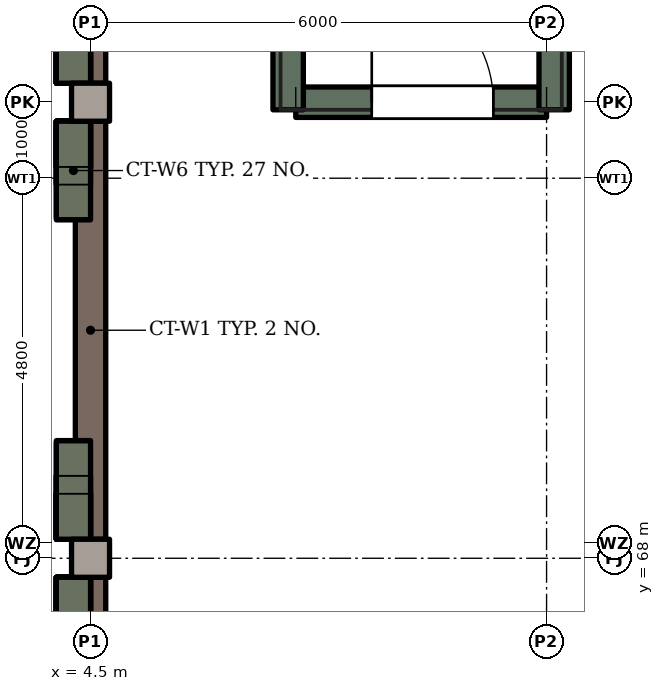
"""IFC4 building model, lengths in metres.
Left out: names, types, materials, properties, quantities, classifications, styles, units other than length and angle.
Written with IfcOpenShell. Run it as: python <this file> out.ifc"""

import sys

from ifc_helpers import new_model, si_unit, direction, frame, frame_2d, origin, origin_2d, place, context, subcontext, project, spatial, rectangle, extrude, element, fill, save


model = new_model("IFC4")
c1 = context("Model", 3, precision=1e-05, world=origin(), true_north=direction((0.0, 1.0)))
c2 = subcontext(c1, "Body", "Model", "MODEL_VIEW")
j1 = project(units=[si_unit("LENGTHUNIT", "METRE"), si_unit("PLANEANGLEUNIT", "RADIAN")], contexts=[c1])
p1 = place(None, origin())
s1 = spatial("IfcSite", under=j1, at=p1, CompositionType="ELEMENT")
p2 = place(p1, origin())
s2 = spatial("IfcBuilding", under=s1, at=p2, CompositionType="ELEMENT")
p3 = place(p2, frame((0.0, 0.0, 4.2)))
s3 = spatial("IfcBuildingStorey", under=s2, at=p3, CompositionType="ELEMENT", Elevation=4.2)
p4 = place(p3, frame((4.275, 67.75, -2.3), z_axis=(0.0, 0.0, 1.0), x_axis=(0.0, -1.0, 0.0)))
e1 = element("IfcWall", 1, at=p4, inside=s3, PredefinedType="STANDARD", context=c2, shape_type="SweptSolid", body=[
    extrude(rectangle(XDim=0.6, YDim=0.45, at=frame_2d((0.3, 0.0))), origin(), (0.0, 0.0, 1.0), 0.8),
])
p5 = place(p3, frame((4.275, 67.75, -1.5), z_axis=(0.0, 0.0, 1.0), x_axis=(0.0, -1.0, 0.0)))
e2 = element("IfcWall", 2, at=p5, inside=s3, PredefinedType="STANDARD", context=c2, shape_type="SweptSolid", body=[
    extrude(rectangle(XDim=0.831, YDim=0.45, at=frame_2d((0.416, 0.0))), origin(), (0.0, 0.0, 1.0), 0.45),
])
p6 = place(p3, frame((4.275, 67.75, -1.05), z_axis=(0.0, 0.0, 1.0), x_axis=(0.0, -1.0, 0.0)))
e3 = element("IfcWall", 3, at=p6, inside=s3, PredefinedType="STANDARD", context=c2, shape_type="SweptSolid", body=[
    extrude(rectangle(XDim=1.272, YDim=0.45, at=frame_2d((0.636, 0.0))), origin(), (0.0, 0.0, 1.0), 0.1),
])
for number, where, z_axis, x_axis in (
    (4, (4.275, 68.25, -2.3), (0.0, 0.0, 1.0), (0.0, 1.0, 0.0)),
    (5, (4.275, 73.75, -2.3), (0.0, 0.0, 1.0), (0.0, -1.0, 0.0)),
):
    element("IfcWall", number, at=place(p3, frame(where, z_axis=z_axis, x_axis=x_axis)), inside=s3, PredefinedType="STANDARD", context=c2, shape_type="SweptSolid", body=[
        extrude(rectangle(XDim=0.6, YDim=0.45, at=frame_2d((0.3, 0.0))), origin(), (0.0, 0.0, 1.0), 0.8),
    ])
for number, where, z_axis, x_axis in (
    (6, (4.275, 68.25, -1.5), (0.0, 0.0, 1.0), (0.0, 1.0, 0.0)),
    (7, (4.275, 73.75, -1.5), (0.0, 0.0, 1.0), (0.0, -1.0, 0.0)),
):
    element("IfcWall", number, at=place(p3, frame(where, z_axis=z_axis, x_axis=x_axis)), inside=s3, PredefinedType="STANDARD", context=c2, shape_type="SweptSolid", body=[
        extrude(rectangle(XDim=0.831, YDim=0.45, at=frame_2d((0.416, 0.0))), origin(), (0.0, 0.0, 1.0), 0.45),
    ])
for number, where, z_axis, x_axis in (
    (8, (4.275, 68.25, -1.05), (0.0, 0.0, 1.0), (0.0, 1.0, 0.0)),
    (9, (4.275, 73.75, -1.05), (0.0, 0.0, 1.0), (0.0, -1.0, 0.0)),
):
    element("IfcWall", number, at=place(p3, frame(where, z_axis=z_axis, x_axis=x_axis)), inside=s3, PredefinedType="STANDARD", context=c2, shape_type="SweptSolid", body=[
        extrude(rectangle(XDim=1.272, YDim=0.45, at=frame_2d((0.636, 0.0))), origin(), (0.0, 0.0, 1.0), 0.1),
    ])
p7 = place(p3, frame((4.275, 74.25, -2.3), z_axis=(0.0, 0.0, 1.0), x_axis=(0.0, 1.0, 0.0)))
e10 = element("IfcWall", 10, at=p7, inside=s3, PredefinedType="STANDARD", context=c2, shape_type="SweptSolid", body=[
    extrude(rectangle(XDim=0.6, YDim=0.45, at=frame_2d((0.3, 0.0))), origin(), (0.0, 0.0, 1.0), 0.8),
])
p8 = place(p3, frame((4.275, 74.25, -1.5), z_axis=(0.0, 0.0, 1.0), x_axis=(0.0, 1.0, 0.0)))
e11 = element("IfcWall", 11, at=p8, inside=s3, PredefinedType="STANDARD", context=c2, shape_type="SweptSolid", body=[
    extrude(rectangle(XDim=0.831, YDim=0.45, at=frame_2d((0.416, 0.0))), origin(), (0.0, 0.0, 1.0), 0.45),
])
p9 = place(p3, frame((4.275, 74.25, -1.05), z_axis=(0.0, 0.0, 1.0), x_axis=(0.0, 1.0, 0.0)))
e12 = element("IfcWall", 12, at=p9, inside=s3, PredefinedType="STANDARD", context=c2, shape_type="SweptSolid", body=[
    extrude(rectangle(XDim=1.272, YDim=0.45, at=frame_2d((0.636, 0.0))), origin(), (0.0, 0.0, 1.0), 0.1),
])
for number, where, z_axis, x_axis in (
    (13, (4.5, 68.0, 0.0), (0.0, 0.0, 1.0), (1.0, 0.0, 0.0)),
    (14, (4.5, 74.0, 0.0), (0.0, 0.0, 1.0), (1.0, 0.0, 0.0)),
):
    element("IfcColumn", number, at=place(p3, frame(where, z_axis=z_axis, x_axis=x_axis)), inside=s3, PredefinedType="COLUMN", context=c2, shape_type="SweptSolid", body=[
        extrude(rectangle(XDim=0.5, YDim=0.5, at=origin_2d()), origin(), (0.0, 0.0, 1.0), 4.2),
    ])
p10 = place(p3, frame((4.5, 62.25, 3.55), z_axis=(0.0, 0.0, 1.0), x_axis=(0.0, 1.0, 0.0)))
e15 = element("IfcWall", 15, at=p10, inside=s3, PredefinedType="STANDARD", context=c2, shape_type="SweptSolid", body=[
    extrude(rectangle(XDim=5.5, YDim=0.4, at=frame_2d((2.75, 0.0))), origin(), (0.0, 0.0, 1.0), 0.65),
])
p11 = place(p3, frame((4.275, 67.75, 0.0), z_axis=(0.0, 0.0, 1.0), x_axis=(0.0, -1.0, 0.0)))
e16 = element("IfcWall", 16, at=p11, inside=s3, PredefinedType="STANDARD", context=c2, shape_type="SweptSolid", body=[
    extrude(rectangle(XDim=0.6, YDim=0.45, at=frame_2d((0.3, 0.0))), origin(), (0.0, 0.0, 1.0), 2.2),
])
p12 = place(p3, frame((4.275, 67.75, 2.2), z_axis=(0.0, 0.0, 1.0), x_axis=(0.0, -1.0, 0.0)))
e17 = element("IfcWall", 17, at=p12, inside=s3, PredefinedType="STANDARD", context=c2, shape_type="SweptSolid", body=[
    extrude(rectangle(XDim=0.6, YDim=0.45, at=frame_2d((0.3, 0.0))), origin(), (0.0, 0.0, 1.0), 0.8),
])
p13 = place(p3, frame((4.275, 67.75, 3.0), z_axis=(0.0, 0.0, 1.0), x_axis=(0.0, -1.0, 0.0)))
e18 = element("IfcWall", 18, at=p13, inside=s3, PredefinedType="STANDARD", context=c2, shape_type="SweptSolid", body=[
    extrude(rectangle(XDim=0.837, YDim=0.45, at=frame_2d((0.418, 0.0))), origin(), (0.0, 0.0, 1.0), 0.45),
])
p14 = place(p3, frame((4.275, 67.75, 3.45), z_axis=(0.0, 0.0, 1.0), x_axis=(0.0, -1.0, 0.0)))
e19 = element("IfcWall", 19, at=p14, inside=s3, PredefinedType="STANDARD", context=c2, shape_type="SweptSolid", body=[
    extrude(rectangle(XDim=1.298, YDim=0.45, at=frame_2d((0.649, 0.0))), origin(), (0.0, 0.0, 1.0), 0.05),
])
p15 = place(p3, frame((4.5, 68.25, 3.55), z_axis=(0.0, 0.0, 1.0), x_axis=(0.0, 1.0, 0.0)))
e20 = element("IfcWall", 20, at=p15, inside=s3, PredefinedType="STANDARD", context=c2, shape_type="SweptSolid", body=[
    extrude(rectangle(XDim=5.5, YDim=0.4, at=frame_2d((2.75, 0.0))), origin(), (0.0, 0.0, 1.0), 0.65),
])
for number, where, z_axis, x_axis in (
    (21, (4.275, 68.25, 0.0), (0.0, 0.0, 1.0), (0.0, 1.0, 0.0)),
    (22, (4.275, 73.75, 0.0), (0.0, 0.0, 1.0), (0.0, -1.0, 0.0)),
):
    element("IfcWall", number, at=place(p3, frame(where, z_axis=z_axis, x_axis=x_axis)), inside=s3, PredefinedType="STANDARD", context=c2, shape_type="SweptSolid", body=[
        extrude(rectangle(XDim=0.6, YDim=0.45, at=frame_2d((0.3, 0.0))), origin(), (0.0, 0.0, 1.0), 2.2),
    ])
for number, where, z_axis, x_axis in (
    (23, (4.275, 68.25, 2.2), (0.0, 0.0, 1.0), (0.0, 1.0, 0.0)),
    (24, (4.275, 73.75, 2.2), (0.0, 0.0, 1.0), (0.0, -1.0, 0.0)),
):
    element("IfcWall", number, at=place(p3, frame(where, z_axis=z_axis, x_axis=x_axis)), inside=s3, PredefinedType="STANDARD", context=c2, shape_type="SweptSolid", body=[
        extrude(rectangle(XDim=0.6, YDim=0.45, at=frame_2d((0.3, 0.0))), origin(), (0.0, 0.0, 1.0), 0.8),
    ])
for number, where, z_axis, x_axis in (
    (25, (4.275, 68.25, 3.0), (0.0, 0.0, 1.0), (0.0, 1.0, 0.0)),
    (26, (4.275, 73.75, 3.0), (0.0, 0.0, 1.0), (0.0, -1.0, 0.0)),
):
    element("IfcWall", number, at=place(p3, frame(where, z_axis=z_axis, x_axis=x_axis)), inside=s3, PredefinedType="STANDARD", context=c2, shape_type="SweptSolid", body=[
        extrude(rectangle(XDim=0.837, YDim=0.45, at=frame_2d((0.418, 0.0))), origin(), (0.0, 0.0, 1.0), 0.45),
    ])
for number, where, z_axis, x_axis in (
    (27, (4.275, 68.25, 3.45), (0.0, 0.0, 1.0), (0.0, 1.0, 0.0)),
    (28, (4.275, 73.75, 3.45), (0.0, 0.0, 1.0), (0.0, -1.0, 0.0)),
):
    element("IfcWall", number, at=place(p3, frame(where, z_axis=z_axis, x_axis=x_axis)), inside=s3, PredefinedType="STANDARD", context=c2, shape_type="SweptSolid", body=[
        extrude(rectangle(XDim=1.298, YDim=0.45, at=frame_2d((0.649, 0.0))), origin(), (0.0, 0.0, 1.0), 0.05),
    ])
p16 = place(p3, frame((4.5, 74.25, 3.55), z_axis=(0.0, 0.0, 1.0), x_axis=(0.0, 1.0, 0.0)))
e29 = element("IfcWall", 29, at=p16, inside=s3, PredefinedType="STANDARD", context=c2, shape_type="SweptSolid", body=[
    extrude(rectangle(XDim=5.5, YDim=0.4, at=frame_2d((2.75, 0.0))), origin(), (0.0, 0.0, 1.0), 0.65),
])
p17 = place(p3, frame((4.275, 74.25, 0.0), z_axis=(0.0, 0.0, 1.0), x_axis=(0.0, 1.0, 0.0)))
e30 = element("IfcWall", 30, at=p17, inside=s3, PredefinedType="STANDARD", context=c2, shape_type="SweptSolid", body=[
    extrude(rectangle(XDim=0.6, YDim=0.45, at=frame_2d((0.3, 0.0))), origin(), (0.0, 0.0, 1.0), 2.2),
])
p18 = place(p3, frame((4.275, 74.25, 2.2), z_axis=(0.0, 0.0, 1.0), x_axis=(0.0, 1.0, 0.0)))
e31 = element("IfcWall", 31, at=p18, inside=s3, PredefinedType="STANDARD", context=c2, shape_type="SweptSolid", body=[
    extrude(rectangle(XDim=0.6, YDim=0.45, at=frame_2d((0.3, 0.0))), origin(), (0.0, 0.0, 1.0), 0.8),
])
p19 = place(p3, frame((4.275, 74.25, 3.0), z_axis=(0.0, 0.0, 1.0), x_axis=(0.0, 1.0, 0.0)))
e32 = element("IfcWall", 32, at=p19, inside=s3, PredefinedType="STANDARD", context=c2, shape_type="SweptSolid", body=[
    extrude(rectangle(XDim=0.837, YDim=0.45, at=frame_2d((0.418, 0.0))), origin(), (0.0, 0.0, 1.0), 0.45),
])
p20 = place(p3, frame((4.275, 74.25, 3.45), z_axis=(0.0, 0.0, 1.0), x_axis=(0.0, 1.0, 0.0)))
e33 = element("IfcWall", 33, at=p20, inside=s3, PredefinedType="STANDARD", context=c2, shape_type="SweptSolid", body=[
    extrude(rectangle(XDim=1.298, YDim=0.45, at=frame_2d((0.649, 0.0))), origin(), (0.0, 0.0, 1.0), 0.05),
])
p21 = place(p3, frame((7.2, 74.0, 0.0), z_axis=(0.0, 0.0, 1.0), x_axis=(1.0, 0.0, 0.0)))
e34 = element("IfcWall", 34, at=p21, inside=s3, PredefinedType="SHEAR", context=c2, shape_type="SweptSolid", body=[
    extrude(rectangle(XDim=3.3, YDim=0.4, at=frame_2d((1.65, 0.0))), origin(), (0.0, 0.0, 1.0), 3.0),
])
p22 = place(p21, frame((1.0, 0.0, 0.0)))
e35 = element("IfcOpeningElement", 35, at=p22, cuts=e34, PredefinedType="OPENING", context=c2, shape_type="SweptSolid", body=[
    extrude(rectangle(XDim=1.6, YDim=2.1, at=frame_2d((0.8, 1.05))), frame((0.0, 0.21, 0.0), z_axis=(0.0, -1.0, 0.0), x_axis=(1.0, 0.0, 0.0)), (0.0, 0.0, 1.0), 0.42),
])
p23 = place(p3, frame((10.6, 79.3, 0.0), z_axis=(0.0, 0.0, 1.0), x_axis=(0.0, -1.0, 0.0)))
e36 = element("IfcWall", 36, at=p23, inside=s3, PredefinedType="SHEAR", context=c2, shape_type="SweptSolid", body=[
    extrude(rectangle(XDim=5.4, YDim=0.4, at=frame_2d((2.7, 0.0))), origin(), (0.0, 0.0, 1.0), 3.0),
])
p24 = place(p3, frame((7.1, 77.2, 0.0), z_axis=(0.0, 0.0, 1.0), x_axis=(0.0, -1.0, 0.0)))
e37 = element("IfcWall", 37, at=p24, inside=s3, PredefinedType="SHEAR", context=c2, shape_type="SweptSolid", body=[
    extrude(rectangle(XDim=3.3, YDim=0.4, at=frame_2d((1.65, 0.0))), origin(), (0.0, 0.0, 1.0), 3.0),
])
p25 = place(p22, origin())
e38 = element("IfcDoor", 38, at=p25, inside=s3, OperationType="SINGLE_SWING_LEFT", PredefinedType="DOOR", context=c2, shape_type="SweptSolid", body=[
    extrude(rectangle(XDim=1.6, YDim=2.1, at=frame_2d((0.8, 1.05))), frame((0.0, 0.025, 0.0), z_axis=(0.0, -1.0, 0.0), x_axis=(1.0, 0.0, 0.0)), (0.0, 0.0, 1.0), 0.05),
])
fill(e35, e38)
save(model, sys.argv[1])
